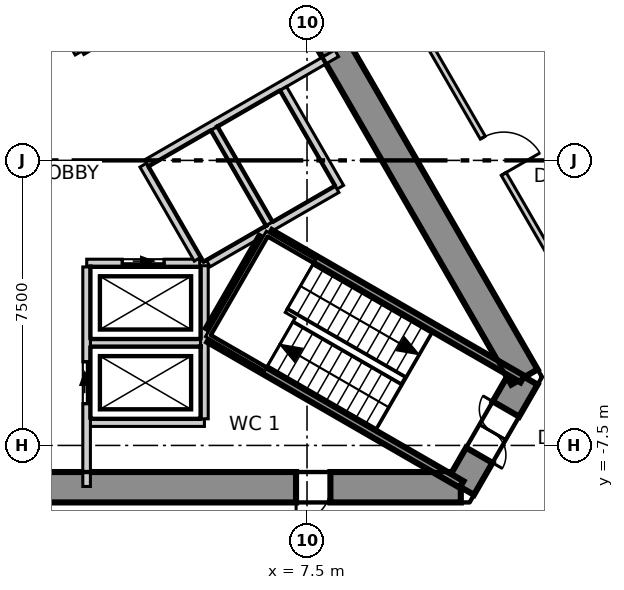
"""IFC4 building model, lengths in metres.
Left out: names, types, materials, properties, quantities, classifications, styles, units other than length and angle.
Written with IfcOpenShell. Run it as: python <this file> out.ifc"""

import sys

from ifc_helpers import new_model, si_unit, direction, frame, frame_2d, origin, place, context, subcontext, project, spatial, polyline, rectangle, outline, extrude, element, fill, save


model = new_model("IFC4")
c1 = context("Model", 3, precision=1e-05, world=origin(), true_north=direction((0.0, 1.0)))
c2 = subcontext(c1, "Body", "Model", "MODEL_VIEW")
j1 = project(units=[si_unit("LENGTHUNIT", "METRE"), si_unit("PLANEANGLEUNIT", "RADIAN")], contexts=[c1])
p1 = place(None, origin())
s1 = spatial("IfcSite", under=j1, at=p1, CompositionType="ELEMENT")
p2 = place(p1, origin())
s2 = spatial("IfcBuilding", under=s1, at=p2, CompositionType="ELEMENT")
p3 = place(p2, frame((0.0, 0.0, 116.3)))
s3 = spatial("IfcBuildingStorey", under=s2, at=p3, CompositionType="ELEMENT", Elevation=116.3)
p4 = place(p3, frame((-11.547, -8.6, -0.3), z_axis=(0.0, 0.0, 1.0), x_axis=(1.0, 0.0, 0.0)))
e1 = element("IfcWall", 1, at=p4, inside=s3, PredefinedType="SHEAR", context=c2, shape_type="SweptSolid", body=[
    extrude(outline(polyline([(-0.231, -0.4), (1.732, -0.4), (3.695, -0.4), (5.658, -0.4), (7.621, -0.4), (9.584, -0.4), (11.547, -0.4), (13.51, -0.4), (15.473, -0.4), (17.436, -0.4), (19.399, -0.4), (21.362, -0.4), (23.325, -0.4), (22.863, 0.4), (20.977, 0.4), (19.091, 0.4), (17.205, 0.4), (15.319, 0.4), (13.433, 0.4), (11.547, 0.4), (9.661, 0.4), (7.775, 0.4), (5.889, 0.4), (4.003, 0.4), (2.117, 0.4), (0.231, 0.4), (-0.231, -0.4)])), origin(), (0.0, 0.0, 1.0), 4.0),
])
p5 = place(p4, frame((18.76, 0.0, 0.3)))
e2 = element("IfcOpeningElement", 2, at=p5, cuts=e1, PredefinedType="OPENING", context=c2, shape_type="SweptSolid", body=[
    extrude(rectangle(XDim=0.9, YDim=2.1, at=frame_2d((0.45, 1.05))), frame((0.0, 0.41, 0.0), z_axis=(0.0, -1.0, 0.0), x_axis=(1.0, 0.0, 0.0)), (0.0, 0.0, 1.0), 0.82),
])
p6 = place(p3, frame((11.547, -8.6, -0.3), z_axis=(0.0, 0.0, 1.0), x_axis=(0.49987182685, 0.866099391942, 0.0)))
e3 = element("IfcWall", 3, at=p6, inside=s3, PredefinedType="SHEAR", context=c2, shape_type="SweptSolid", body=[
    extrude(outline(polyline([(-0.231, -0.4), (1.674, -0.4), (3.579, -0.4), (3.118, 0.4), (1.674, 0.4), (0.231, 0.4), (-0.231, -0.4)])), origin(), (0.0, 0.0, 1.0), 4.0),
])
p7 = place(p6, frame((0.974, 0.0, 0.3)))
e4 = element("IfcOpeningElement", 4, at=p7, cuts=e3, PredefinedType="OPENING", context=c2, shape_type="SweptSolid", body=[
    extrude(rectangle(XDim=1.4, YDim=2.1, at=frame_2d((0.7, 1.05))), frame((0.0, 0.41, 0.0), z_axis=(0.0, -1.0, 0.0), x_axis=(1.0, 0.0, 0.0)), (0.0, 0.0, 1.0), 0.82),
])
p8 = place(p3, frame((13.221, -5.7, -0.3), z_axis=(0.0, 0.0, 1.0), x_axis=(-0.499995765644, 0.866027848477, 0.0)))
e5 = element("IfcWall", 5, at=p8, inside=s3, PredefinedType="SHEAR", context=c2, shape_type="SweptSolid", body=[
    extrude(outline(polyline([(-0.231, -0.4), (1.732, -0.4), (3.695, -0.4), (5.658, -0.4), (7.621, -0.4), (9.584, -0.4), (11.547, -0.4), (13.51, -0.4), (15.473, -0.4), (17.436, -0.4), (19.399, -0.4), (21.362, -0.4), (23.325, -0.4), (22.863, 0.4), (20.977, 0.4), (19.091, 0.4), (17.205, 0.4), (15.319, 0.4), (13.433, 0.4), (11.547, 0.4), (9.661, 0.4), (7.775, 0.4), (5.889, 0.4), (4.003, 0.4), (2.117, 0.4), (0.231, 0.4), (-0.231, -0.4)])), origin(), (0.0, 0.0, 1.0), 4.0),
])
p9 = place(p8, frame((10.647, 0.0, 0.3)))
e6 = element("IfcOpeningElement", 6, at=p9, cuts=e5, PredefinedType="OPENING", context=c2, shape_type="SweptSolid", body=[
    extrude(rectangle(XDim=1.8, YDim=2.1, at=frame_2d((0.9, 1.05))), frame((0.0, 0.41, 0.0), z_axis=(0.0, -1.0, 0.0), x_axis=(1.0, 0.0, 0.0)), (0.0, 0.0, 1.0), 0.82),
])
p10 = place(p3, frame((32.048, -14.861, 0.0), z_axis=(0.0, 0.0, 1.0), x_axis=(-0.499996704161, 0.866027306629, 0.0)))
e7 = element("IfcWall", 7, at=p10, inside=s3, PredefinedType="ELEMENTEDWALL", context=c2, shape_type="SweptSolid", body=[
    extrude(rectangle(XDim=57.769, YDim=0.2, at=frame_2d((28.884, 0.0))), origin(), (0.0, 0.0, 1.0), 3.7),
])
p11 = place(p10, frame((2.302, 0.0, 0.9)))
e8 = element("IfcOpeningElement", 8, at=p11, cuts=e7, PredefinedType="OPENING", context=c2, shape_type="SweptSolid", body=[
    extrude(rectangle(XDim=4.9, YDim=2.5, at=frame_2d((2.45, 1.25))), frame((0.0, 0.11, 0.0), z_axis=(0.0, -1.0, 0.0), x_axis=(1.0, 0.0, 0.0)), (0.0, 0.0, 1.0), 0.22),
])
p12 = place(p10, frame((9.199, 0.0, 0.9)))
e9 = element("IfcOpeningElement", 9, at=p12, cuts=e7, PredefinedType="OPENING", context=c2, shape_type="SweptSolid", body=[
    extrude(rectangle(XDim=4.9, YDim=2.5, at=frame_2d((2.45, 1.25))), frame((0.0, 0.11, 0.0), z_axis=(0.0, -1.0, 0.0), x_axis=(1.0, 0.0, 0.0)), (0.0, 0.0, 1.0), 0.22),
])
p13 = place(p10, frame((16.097, 0.0, 0.9)))
e10 = element("IfcOpeningElement", 10, at=p13, cuts=e7, PredefinedType="OPENING", context=c2, shape_type="SweptSolid", body=[
    extrude(rectangle(XDim=4.9, YDim=2.5, at=frame_2d((2.45, 1.25))), frame((0.0, 0.11, 0.0), z_axis=(0.0, -1.0, 0.0), x_axis=(1.0, 0.0, 0.0)), (0.0, 0.0, 1.0), 0.22),
])
p14 = place(p10, frame((22.995, 0.0, 0.9)))
e11 = element("IfcOpeningElement", 11, at=p14, cuts=e7, PredefinedType="OPENING", context=c2, shape_type="SweptSolid", body=[
    extrude(rectangle(XDim=4.9, YDim=2.5, at=frame_2d((2.45, 1.25))), frame((0.0, 0.11, 0.0), z_axis=(0.0, -1.0, 0.0), x_axis=(1.0, 0.0, 0.0)), (0.0, 0.0, 1.0), 0.22),
])
p15 = place(p10, frame((29.893, 0.0, 0.9)))
e12 = element("IfcOpeningElement", 12, at=p15, cuts=e7, PredefinedType="OPENING", context=c2, shape_type="SweptSolid", body=[
    extrude(rectangle(XDim=4.9, YDim=2.5, at=frame_2d((2.45, 1.25))), frame((0.0, 0.11, 0.0), z_axis=(0.0, -1.0, 0.0), x_axis=(1.0, 0.0, 0.0)), (0.0, 0.0, 1.0), 0.22),
])
p16 = place(p10, frame((36.791, 0.0, 0.9)))
e13 = element("IfcOpeningElement", 13, at=p16, cuts=e7, PredefinedType="OPENING", context=c2, shape_type="SweptSolid", body=[
    extrude(rectangle(XDim=4.9, YDim=2.5, at=frame_2d((2.45, 1.25))), frame((0.0, 0.11, 0.0), z_axis=(0.0, -1.0, 0.0), x_axis=(1.0, 0.0, 0.0)), (0.0, 0.0, 1.0), 0.22),
])
p17 = place(p10, frame((43.689, 0.0, 0.9)))
e14 = element("IfcOpeningElement", 14, at=p17, cuts=e7, PredefinedType="OPENING", context=c2, shape_type="SweptSolid", body=[
    extrude(rectangle(XDim=4.9, YDim=2.5, at=frame_2d((2.45, 1.25))), frame((0.0, 0.11, 0.0), z_axis=(0.0, -1.0, 0.0), x_axis=(1.0, 0.0, 0.0)), (0.0, 0.0, 1.0), 0.22),
])
p18 = place(p10, frame((50.587, 0.0, 0.9)))
e15 = element("IfcOpeningElement", 15, at=p18, cuts=e7, PredefinedType="OPENING", context=c2, shape_type="SweptSolid", body=[
    extrude(rectangle(XDim=4.9, YDim=2.5, at=frame_2d((2.45, 1.25))), frame((0.0, 0.11, 0.0), z_axis=(0.0, -1.0, 0.0), x_axis=(1.0, 0.0, 0.0)), (0.0, 0.0, 1.0), 0.22),
])
p19 = place(p3, frame((9.803, 4.62, 0.0), z_axis=(0.0, 0.0, 1.0), x_axis=(0.500023004316, -0.866012121829, 0.0)))
e16 = element("IfcWall", 16, at=p19, inside=s3, PredefinedType="PARTITIONING", context=c2, shape_type="SweptSolid", body=[
    extrude(rectangle(XDim=17.719, YDim=0.15, at=frame_2d((8.86, 0.0))), origin(), (0.0, 0.0, 1.0), 3.7),
])
p20 = place(p19, frame((14.756, 0.0, 0.0)))
e17 = element("IfcOpeningElement", 17, at=p20, cuts=e16, PredefinedType="OPENING", context=c2, shape_type="SweptSolid", body=[
    extrude(rectangle(XDim=1.1, YDim=2.1, at=frame_2d((0.55, 1.05))), frame((0.0, 0.085, 0.0), z_axis=(0.0, -1.0, 0.0), x_axis=(1.0, 0.0, 0.0)), (0.0, 0.0, 1.0), 0.17),
])
p21 = place(p19, frame((4.645, 0.0, 0.0)))
e18 = element("IfcOpeningElement", 18, at=p21, cuts=e16, PredefinedType="OPENING", context=c2, shape_type="SweptSolid", body=[
    extrude(rectangle(XDim=1.1, YDim=2.1, at=frame_2d((0.55, 1.05))), frame((0.0, 0.085, 0.0), z_axis=(0.0, -1.0, 0.0), x_axis=(1.0, 0.0, 0.0)), (0.0, 0.0, 1.0), 0.17),
])
p22 = place(p19, frame((11.145, 0.0, 0.0)))
e19 = element("IfcOpeningElement", 19, at=p22, cuts=e16, PredefinedType="OPENING", context=c2, shape_type="SweptSolid", body=[
    extrude(rectangle(XDim=0.9, YDim=2.1, at=frame_2d((0.45, 1.05))), frame((0.0, 0.085, 0.0), z_axis=(0.0, -1.0, 0.0), x_axis=(1.0, 0.0, 0.0)), (0.0, 0.0, 1.0), 0.17),
])
p23 = place(p19, frame((8.745, 0.0, 0.0)))
e20 = element("IfcOpeningElement", 20, at=p23, cuts=e16, PredefinedType="OPENING", context=c2, shape_type="SweptSolid", body=[
    extrude(rectangle(XDim=0.9, YDim=2.1, at=frame_2d((0.45, 1.05))), frame((0.0, 0.085, 0.0), z_axis=(0.0, -1.0, 0.0), x_axis=(1.0, 0.0, 0.0)), (0.0, 0.0, 1.0), 0.17),
])
p24 = place(p3, frame((1.8, -4.8, 0.0), z_axis=(0.0, 0.0, 1.0), x_axis=(1.0, 0.0, 0.0)))
e21 = element("IfcWall", 21, at=p24, inside=s3, PredefinedType="SOLIDWALL", context=c2, shape_type="SweptSolid", body=[
    extrude(rectangle(XDim=2.9, YDim=0.2, at=frame_2d((1.45, 0.0))), origin(), (0.0, 0.0, 1.0), 3.7),
])
p25 = place(p3, frame((1.8, -6.9, 0.0), z_axis=(0.0, 0.0, 1.0), x_axis=(1.0, 0.0, 0.0)))
e22 = element("IfcWall", 22, at=p25, inside=s3, PredefinedType="SOLIDWALL", context=c2, shape_type="SweptSolid", body=[
    extrude(rectangle(XDim=3.0, YDim=0.2, at=frame_2d((1.5, 0.0))), origin(), (0.0, 0.0, 1.0), 3.7),
])
p26 = place(p3, frame((1.703, -2.7, 0.0), z_axis=(0.0, 0.0, 1.0), x_axis=(1.0, 0.0, 0.0)))
e23 = element("IfcWall", 23, at=p26, inside=s3, PredefinedType="SOLIDWALL", context=c2, shape_type="SweptSolid", body=[
    extrude(rectangle(XDim=2.973, YDim=0.2, at=frame_2d((1.487, 0.0))), origin(), (0.0, 0.0, 1.0), 3.7),
])
p27 = place(p26, frame((0.936, 0.0, 0.0)))
e24 = element("IfcOpeningElement", 24, at=p27, cuts=e23, PredefinedType="OPENING", context=c2, shape_type="SweptSolid", body=[
    extrude(rectangle(XDim=1.1, YDim=2.1, at=frame_2d((0.55, 1.05))), frame((0.0, 0.11, 0.0), z_axis=(0.0, -1.0, 0.0), x_axis=(1.0, 0.0, 0.0)), (0.0, 0.0, 1.0), 0.22),
])
p28 = place(p3, frame((0.0, 5.4, 0.0), z_axis=(0.0, 0.0, 1.0), x_axis=(0.500103862429, -0.865965430478, 0.0)))
e25 = element("IfcWall", 25, at=p28, inside=s3, PredefinedType="SOLIDWALL", context=c2, shape_type="SweptSolid", body=[
    extrude(rectangle(XDim=2.973, YDim=0.2, at=frame_2d((1.487, 0.0))), origin(), (0.0, 0.0, 1.0), 3.7),
])
p29 = place(p28, frame((0.937, 0.0, 0.0)))
e26 = element("IfcOpeningElement", 26, at=p29, cuts=e25, PredefinedType="OPENING", context=c2, shape_type="SweptSolid", body=[
    extrude(rectangle(XDim=1.1, YDim=2.1, at=frame_2d((0.55, 1.05))), frame((0.0, 0.11, 0.0), z_axis=(0.0, -1.0, 0.0), x_axis=(1.0, 0.0, 0.0)), (0.0, 0.0, 1.0), 0.22),
])
p30 = place(p3, frame((3.19, -0.125, 0.0), z_axis=(0.0, 0.0, 1.0), x_axis=(0.499988658015, -0.866031951983, 0.0)))
e27 = element("IfcWall", 27, at=p30, inside=s3, PredefinedType="SOLIDWALL", context=c2, shape_type="SweptSolid", body=[
    extrude(rectangle(XDim=2.858, YDim=0.2, at=frame_2d((1.429, 0.0))), origin(), (0.0, 0.0, 1.0), 3.7),
])
p31 = place(p3, frame((1.577, 2.874, 0.0), z_axis=(0.0, 0.0, 1.0), x_axis=(0.866073694534, 0.499916348638, 0.0)))
e28 = element("IfcWall", 28, at=p31, inside=s3, PredefinedType="SOLIDWALL", context=c2, shape_type="SweptSolid", body=[
    extrude(rectangle(XDim=5.777, YDim=0.2, at=frame_2d((2.888, 0.0))), origin(), (0.0, 0.0, 1.0), 3.7),
])
p32 = place(p31, frame((2.497, 0.0, 0.0)))
e29 = element("IfcOpeningElement", 29, at=p32, cuts=e28, PredefinedType="OPENING", context=c2, shape_type="SweptSolid", body=[
    extrude(rectangle(XDim=1.1, YDim=2.1, at=frame_2d((0.55, 1.05))), frame((0.0, 0.11, 0.0), z_axis=(0.0, -1.0, 0.0), x_axis=(1.0, 0.0, 0.0)), (0.0, 0.0, 1.0), 0.22),
])
p33 = place(p3, frame((1.7, -8.58, 0.0), z_axis=(0.0, 0.0, 1.0), x_axis=(0.0, 1.0, 0.0)))
e30 = element("IfcWall", 30, at=p33, inside=s3, PredefinedType="SOLIDWALL", context=c2, shape_type="SweptSolid", body=[
    extrude(rectangle(XDim=5.777, YDim=0.2, at=frame_2d((2.889, 0.0))), origin(), (0.0, 0.0, 1.0), 3.7),
])
p34 = place(p33, frame((2.18, 0.0, 0.0)))
e31 = element("IfcOpeningElement", 31, at=p34, cuts=e30, PredefinedType="OPENING", context=c2, shape_type="SweptSolid", body=[
    extrude(rectangle(XDim=1.1, YDim=2.1, at=frame_2d((0.55, 1.05))), frame((0.0, 0.11, 0.0), z_axis=(0.0, -1.0, 0.0), x_axis=(1.0, 0.0, 0.0)), (0.0, 0.0, 1.0), 0.22),
])
p35 = place(p3, frame((4.8, -6.8, 0.0), z_axis=(0.0, 0.0, 1.0), x_axis=(0.0, 1.0, 0.0)))
e32 = element("IfcWall", 32, at=p35, inside=s3, PredefinedType="SOLIDWALL", context=c2, shape_type="SweptSolid", body=[
    extrude(rectangle(XDim=4.029, YDim=0.2, at=frame_2d((2.015, 0.0))), origin(), (0.0, 0.0, 1.0), 3.7),
])
p36 = place(p3, frame((3.278, -0.071, 0.0), z_axis=(0.0, 0.0, 1.0), x_axis=(0.865929348003, 0.5001663366, 0.0)))
e33 = element("IfcWall", 33, at=p36, inside=s3, PredefinedType="SOLIDWALL", context=c2, shape_type="SweptSolid", body=[
    extrude(rectangle(XDim=5.776, YDim=0.2, at=frame_2d((2.888, 0.0))), origin(), (0.0, 0.0, 1.0), 3.7),
])
p37 = place(p3, frame((6.876, 1.891, 0.0), z_axis=(0.0, 0.0, 1.0), x_axis=(0.499990139034, -0.866031096941, 0.0)))
e34 = element("IfcWall", 34, at=p37, inside=s3, PredefinedType="SOLIDWALL", context=c2, shape_type="SweptSolid", body=[
    extrude(rectangle(XDim=3.0, YDim=0.2, at=frame_2d((1.5, 0.0))), origin(), (0.0, 0.0, 1.0), 3.7),
])
p38 = place(p3, frame((5.057, 0.841, 0.0), z_axis=(0.0, 0.0, 1.0), x_axis=(0.50012328804, -0.865954211699, 0.0)))
e35 = element("IfcWall", 35, at=p38, inside=s3, PredefinedType="SOLIDWALL", context=c2, shape_type="SweptSolid", body=[
    extrude(rectangle(XDim=2.9, YDim=0.2, at=frame_2d((1.45, 0.0))), origin(), (0.0, 0.0, 1.0), 3.7),
])
p39 = place(p3, frame((4.9, -2.714, 0.0), z_axis=(0.0, 0.0, 1.0), x_axis=(0.865992350556, 0.500057245502, 0.0)))
e36 = element("IfcWall", 36, at=p39, inside=s3, PredefinedType="SOLIDWALL", context=c2, shape_type="SweptSolid", body=[
    extrude(rectangle(XDim=3.914, YDim=0.2, at=frame_2d((1.957, 0.0))), origin(), (0.0, 0.0, 1.0), 3.7),
])
p40 = place(p3, frame((4.929, -4.693, 0.0), z_axis=(0.0, 0.0, 1.0), x_axis=(0.866005769735, -0.50003400563, 0.0)))
e37 = element("IfcWall", 37, at=p40, inside=s3, PredefinedType="SOLIDWALL", context=c2, shape_type="SweptSolid", body=[
    extrude(rectangle(XDim=7.665, YDim=0.2, at=frame_2d((3.833, 0.0))), origin(), (0.0, 0.0, 1.0), 3.7),
])
p41 = place(p3, frame((4.929, -4.462, 0.0), z_axis=(0.0, 0.0, 1.0), x_axis=(0.500200581029, 0.865909567298, 0.0)))
e38 = element("IfcWall", 38, at=p41, inside=s3, PredefinedType="SOLIDWALL", context=c2, shape_type="SweptSolid", body=[
    extrude(rectangle(XDim=2.799, YDim=0.2, at=frame_2d((1.399, 0.0))), origin(), (0.0, 0.0, 1.0), 3.7),
])
p42 = place(p3, frame((6.529, -1.922, 0.0), z_axis=(0.0, 0.0, 1.0), x_axis=(0.866060938598, -0.499938446846, 0.0)))
e39 = element("IfcWall", 39, at=p42, inside=s3, PredefinedType="SOLIDWALL", context=c2, shape_type="SweptSolid", body=[
    extrude(rectangle(XDim=7.665, YDim=0.2, at=frame_2d((3.832, 0.0))), origin(), (0.0, 0.0, 1.0), 3.7),
])
p43 = place(p27, origin())
e40 = element("IfcDoor", 40, at=p43, inside=s3, OperationType="SLIDING_TO_LEFT", PredefinedType="DOOR", context=c2, shape_type="SweptSolid", body=[
    extrude(rectangle(XDim=1.1, YDim=2.1, at=frame_2d((0.55, 1.05))), frame((0.0, 0.025, 0.0), z_axis=(0.0, -1.0, 0.0), x_axis=(1.0, 0.0, 0.0)), (0.0, 0.0, 1.0), 0.05),
])
fill(e24, e40)
p44 = place(p34, origin())
e41 = element("IfcDoor", 41, at=p44, inside=s3, OperationType="SLIDING_TO_LEFT", PredefinedType="DOOR", context=c2, shape_type="SweptSolid", body=[
    extrude(rectangle(XDim=1.1, YDim=2.1, at=frame_2d((0.55, 1.05))), frame((0.0, 0.025, 0.0), z_axis=(0.0, -1.0, 0.0), x_axis=(1.0, 0.0, 0.0)), (0.0, 0.0, 1.0), 0.05),
])
fill(e31, e41)
p45 = place(p21, origin())
e42 = element("IfcDoor", 42, at=p45, inside=s3, OperationType="SINGLE_SWING_LEFT", PredefinedType="DOOR", context=c2, shape_type="SweptSolid", body=[
    extrude(rectangle(XDim=1.1, YDim=2.1, at=frame_2d((0.55, 1.05))), frame((0.0, 0.025, 0.0), z_axis=(0.0, -1.0, 0.0), x_axis=(1.0, 0.0, 0.0)), (0.0, 0.0, 1.0), 0.05),
])
fill(e18, e42)
p46 = place(p7, origin())
e43 = element("IfcDoor", 43, at=p46, inside=s3, OperationType="DOUBLE_DOOR_SINGLE_SWING", PredefinedType="DOOR", context=c2, shape_type="SweptSolid", body=[
    extrude(rectangle(XDim=1.4, YDim=2.1, at=frame_2d((0.7, 1.05))), frame((0.0, 0.025, 0.0), z_axis=(0.0, -1.0, 0.0), x_axis=(1.0, 0.0, 0.0)), (0.0, 0.0, 1.0), 0.05),
])
fill(e4, e43)
p47 = place(p5, origin())
e44 = element("IfcDoor", 44, at=p47, inside=s3, OperationType="SINGLE_SWING_LEFT", PredefinedType="DOOR", context=c2, shape_type="SweptSolid", body=[
    extrude(rectangle(XDim=0.9, YDim=2.1, at=frame_2d((0.45, 1.05))), frame((0.0, 0.125, 0.0), z_axis=(0.0, -1.0, 0.0), x_axis=(1.0, 0.0, 0.0)), (0.0, 0.0, 1.0), 0.05),
])
fill(e2, e44)
save(model, sys.argv[1])
